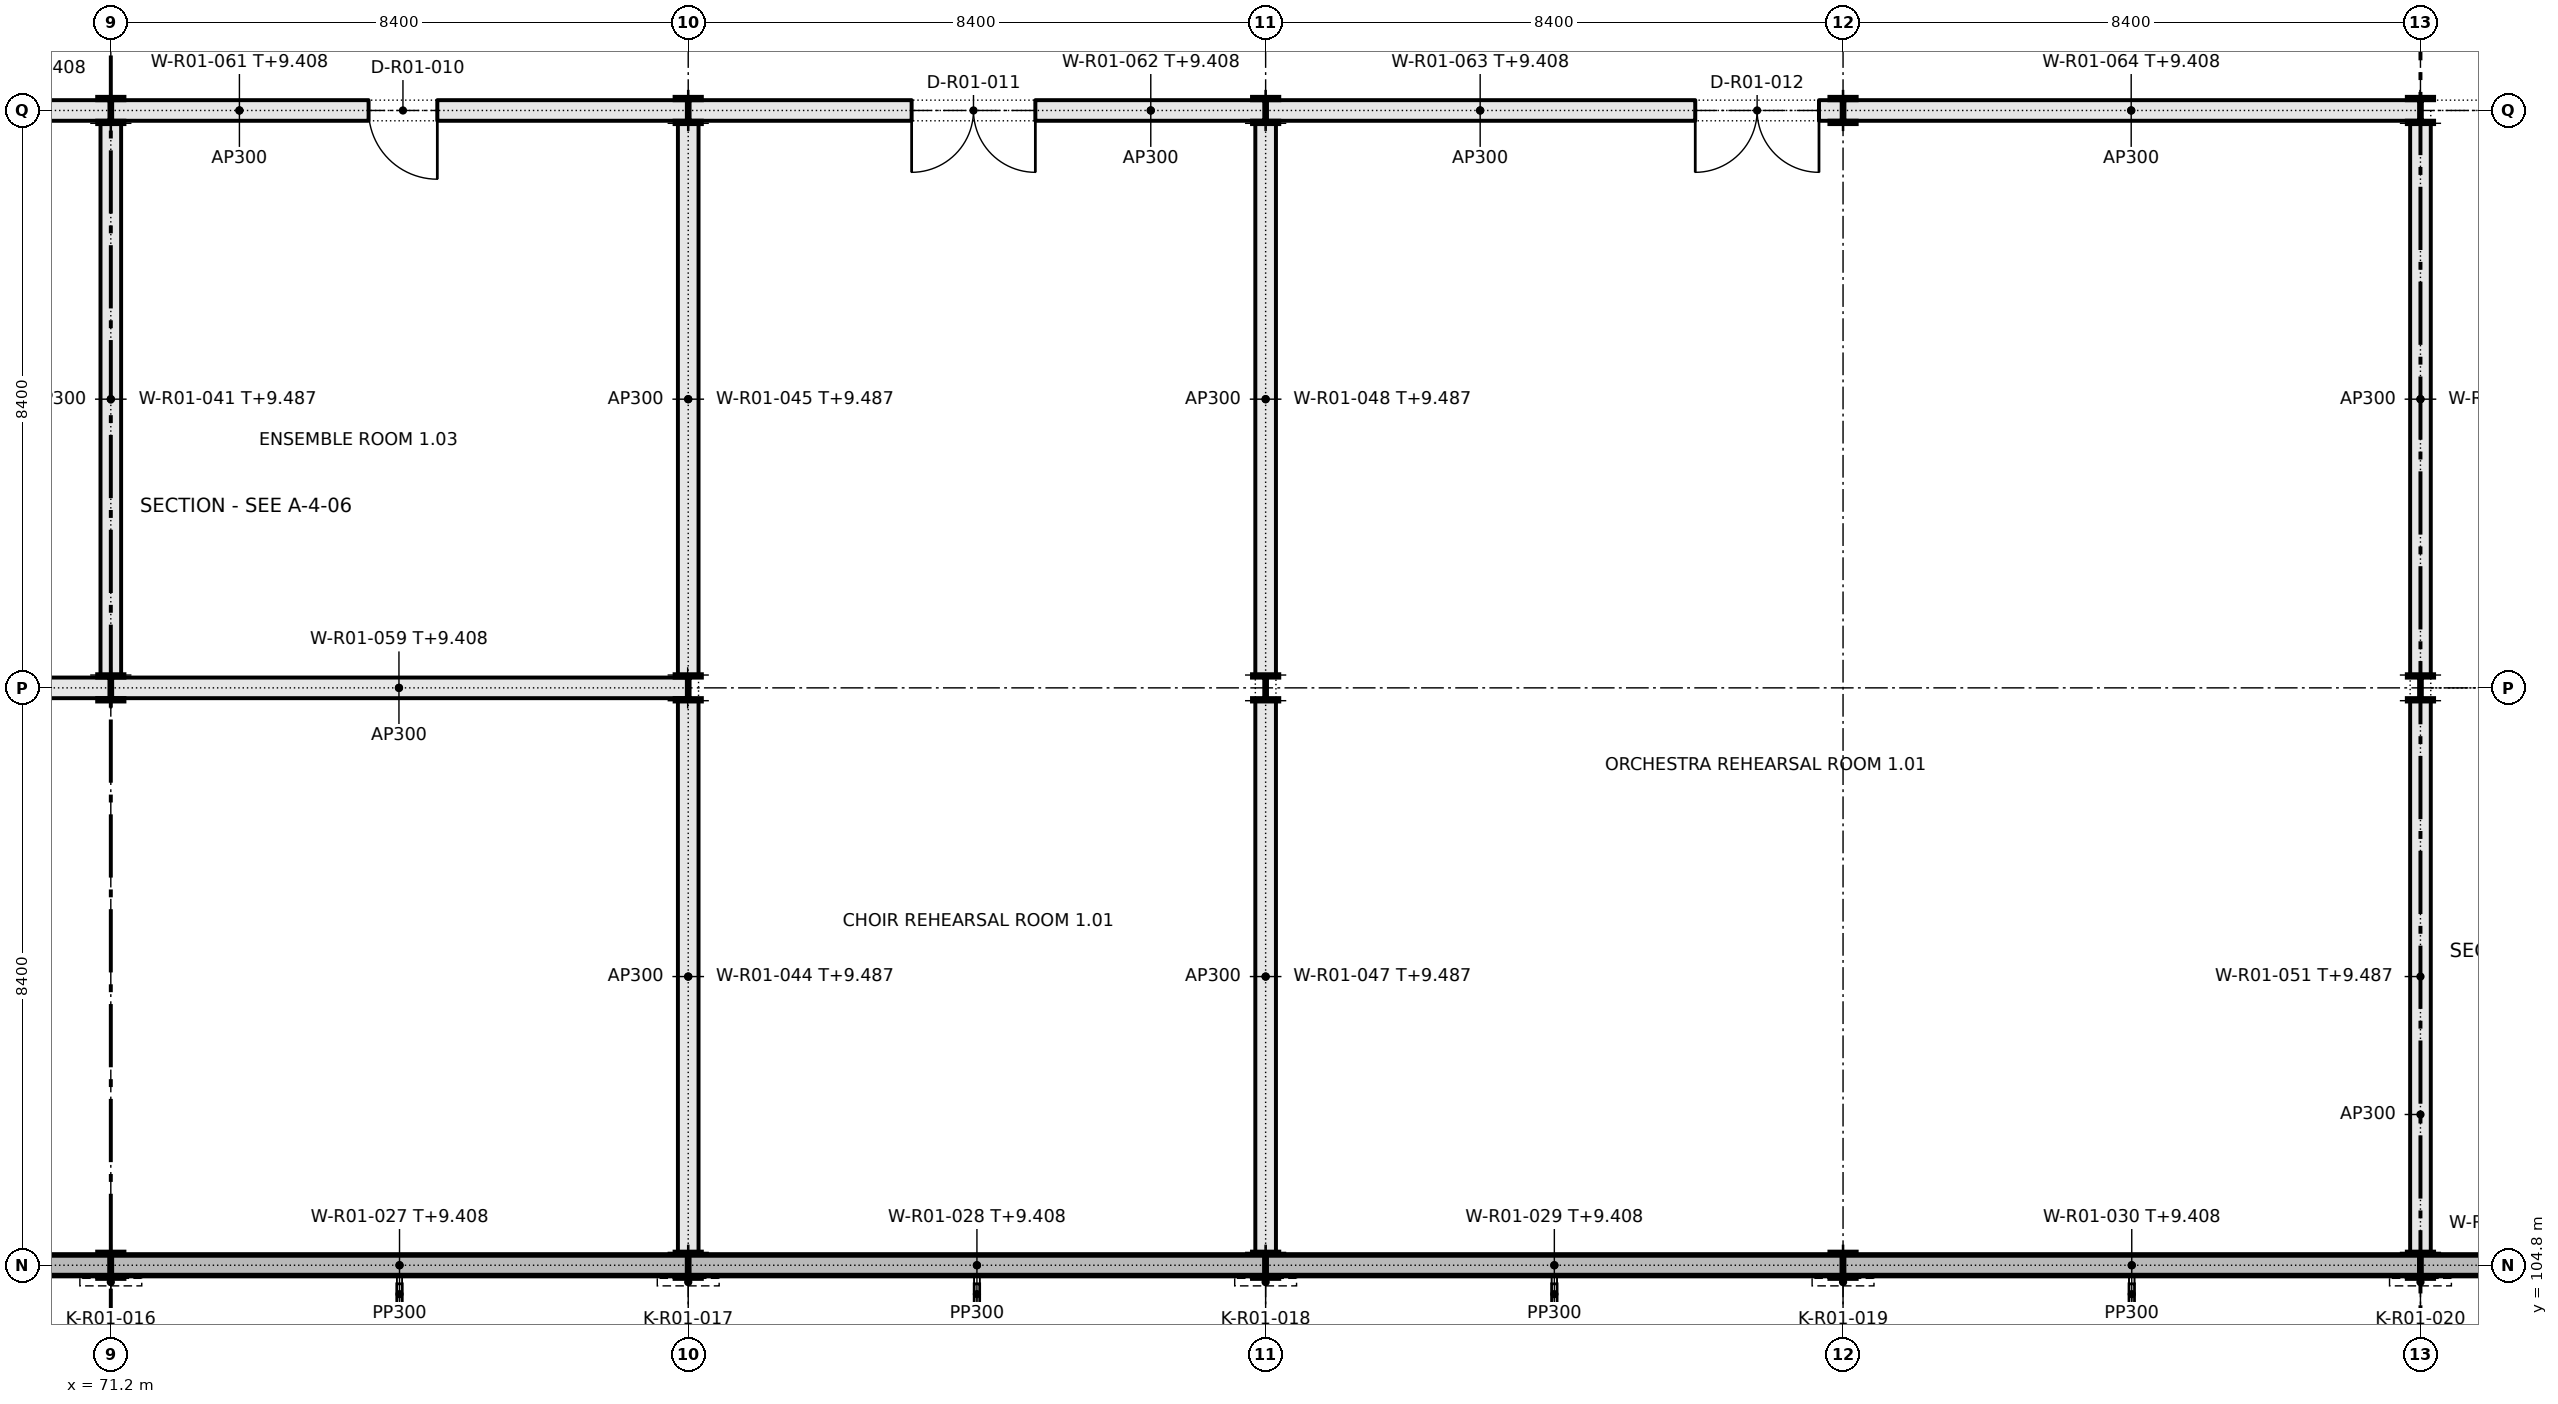
"""IFC4 building model, lengths in metres.
Left out: names, types, materials, properties, quantities, classifications, styles, units other than length and angle.
Written with IfcOpenShell. Run it as: python <this file> out.ifc"""

import sys

from ifc_helpers import new_model, si_unit, direction, frame, frame_2d, origin, origin_2d, place, context, subcontext, project, spatial, rectangle, i_section, extrude, element, fill, save


model = new_model("IFC4")
c1 = context("Model", 3, precision=1e-05, world=origin(), true_north=direction((0.0, 1.0)))
c2 = subcontext(c1, "Body", "Model", "MODEL_VIEW")
j1 = project(units=[si_unit("LENGTHUNIT", "METRE"), si_unit("PLANEANGLEUNIT", "RADIAN")], contexts=[c1])
p1 = place(None, origin())
s1 = spatial("IfcSite", under=j1, at=p1, CompositionType="ELEMENT")
p2 = place(p1, origin())
s2 = spatial("IfcBuilding", under=s1, at=p2, CompositionType="ELEMENT")
p3 = place(p2, frame((0.0, 0.0, 5.4)))
s3 = spatial("IfcBuildingStorey", under=s2, at=p3, CompositionType="ELEMENT", Elevation=5.4)
for number, where, z_axis, x_axis in (
    (1, (71.2, 104.8, 0.0), (0.0, 0.0, 1.0), (1.0, 0.0, 0.0)),
    (2, (71.2, 113.2, 0.0), (0.0, 0.0, 1.0), (1.0, 0.0, 0.0)),
    (3, (71.2, 121.6, 0.0), (0.0, 0.0, 1.0), (1.0, 0.0, 0.0)),
    (4, (79.6, 104.8, 0.0), (0.0, 0.0, 1.0), (1.0, 0.0, 0.0)),
    (5, (79.6, 113.2, 0.0), (0.0, 0.0, 1.0), (1.0, 0.0, 0.0)),
    (6, (79.6, 121.6, 0.0), (0.0, 0.0, 1.0), (1.0, 0.0, 0.0)),
    (7, (88.0, 104.8, 0.0), (0.0, 0.0, 1.0), (1.0, 0.0, 0.0)),
    (8, (88.0, 113.2, 0.0), (0.0, 0.0, 1.0), (1.0, 0.0, 0.0)),
    (9, (88.0, 121.6, 0.0), (0.0, 0.0, 1.0), (1.0, 0.0, 0.0)),
    (10, (96.4, 104.8, 0.0), (0.0, 0.0, 1.0), (1.0, 0.0, 0.0)),
    (11, (96.4, 121.6, 0.0), (0.0, 0.0, 1.0), (1.0, 0.0, 0.0)),
    (12, (104.8, 104.8, 0.0), (0.0, 0.0, 1.0), (1.0, 0.0, 0.0)),
    (13, (104.8, 113.2, 0.0), (0.0, 0.0, 1.0), (1.0, 0.0, 0.0)),
    (14, (104.8, 121.6, 0.0), (0.0, 0.0, 1.0), (1.0, 0.0, 0.0)),
):
    element("IfcColumn", number, at=place(p3, frame(where, z_axis=z_axis, x_axis=x_axis)), inside=s3, PredefinedType="COLUMN", context=c2, shape_type="SweptSolid", body=[
        extrude(i_section(OverallWidth=0.373, OverallDepth=0.373, WebThickness=0.016, FlangeThickness=0.026, FilletRadius=0.015, at=origin_2d()), origin(), (0.0, 0.0, 1.0), 4.8),
    ])
p4 = place(p3, frame((62.808, 104.8, 0.0), z_axis=(0.0, 0.0, 1.0), x_axis=(1.0, 0.0, 0.0)))
e15 = element("IfcWall", 15, at=p4, inside=s3, PredefinedType="SOLIDWALL", context=c2, shape_type="SweptSolid", body=[
    extrude(rectangle(XDim=8.4, YDim=0.3, at=frame_2d((4.2, 0.0))), origin(), (0.0, 0.0, 1.0), 4.008),
])
p5 = place(p3, frame((71.192, 104.8, 0.0), z_axis=(0.0, 0.0, 1.0), x_axis=(1.0, 0.0, 0.0)))
e16 = element("IfcWall", 16, at=p5, inside=s3, PredefinedType="SOLIDWALL", context=c2, shape_type="SweptSolid", body=[
    extrude(rectangle(XDim=8.416, YDim=0.3, at=frame_2d((4.208, 0.0))), origin(), (0.0, 0.0, 1.0), 4.008),
])
for number, where, z_axis, x_axis in (
    (17, (79.592, 104.8, 0.0), (0.0, 0.0, 1.0), (1.0, 0.0, 0.0)),
    (18, (87.992, 104.8, 0.0), (0.0, 0.0, 1.0), (1.0, 0.0, 0.0)),
):
    element("IfcWall", number, at=place(p3, frame(where, z_axis=z_axis, x_axis=x_axis)), inside=s3, PredefinedType="SOLIDWALL", context=c2, shape_type="SweptSolid", body=[
        extrude(rectangle(XDim=8.417, YDim=0.3, at=frame_2d((4.208, 0.0))), origin(), (0.0, 0.0, 1.0), 4.008),
    ])
p6 = place(p3, frame((96.392, 104.8, 0.0), z_axis=(0.0, 0.0, 1.0), x_axis=(1.0, 0.0, 0.0)))
e19 = element("IfcWall", 19, at=p6, inside=s3, PredefinedType="SOLIDWALL", context=c2, shape_type="SweptSolid", body=[
    extrude(rectangle(XDim=8.416, YDim=0.3, at=frame_2d((4.208, 0.0))), origin(), (0.0, 0.0, 1.0), 4.008),
])
p7 = place(p3, frame((104.792, 104.8, 0.0), z_axis=(0.0, 0.0, 1.0), x_axis=(1.0, 0.0, 0.0)))
e20 = element("IfcWall", 20, at=p7, inside=s3, PredefinedType="SOLIDWALL", context=c2, shape_type="SweptSolid", body=[
    extrude(rectangle(XDim=8.417, YDim=0.3, at=frame_2d((4.208, 0.0))), origin(), (0.0, 0.0, 1.0), 4.008),
])
p8 = place(p7, frame((3.008, 0.0, 0.0)))
e21 = element("IfcOpeningElement", 21, at=p8, cuts=e20, PredefinedType="OPENING", context=c2, shape_type="SweptSolid", body=[
    extrude(rectangle(XDim=2.4, YDim=2.4, at=frame_2d((1.2, 1.2))), frame((0.0, 0.16, 0.0), z_axis=(0.0, -1.0, 0.0), x_axis=(1.0, 0.0, 0.0)), (0.0, 0.0, 1.0), 0.32),
])
p9 = place(p3, frame((71.2, 113.387, 0.0), z_axis=(0.0, 0.0, 1.0), x_axis=(0.0, 1.0, 0.0)))
e22 = element("IfcWall", 22, at=p9, inside=s3, PredefinedType="PARTITIONING", context=c2, shape_type="SweptSolid", body=[
    extrude(rectangle(XDim=8.027, YDim=0.3, at=frame_2d((4.013, 0.0))), origin(), (0.0, 0.0, 1.0), 4.087),
])
p10 = place(p3, frame((79.6, 104.987, 0.0), z_axis=(0.0, 0.0, 1.0), x_axis=(0.0, 1.0, 0.0)))
e23 = element("IfcWall", 23, at=p10, inside=s3, PredefinedType="PARTITIONING", context=c2, shape_type="SweptSolid", body=[
    extrude(rectangle(XDim=8.027, YDim=0.3, at=frame_2d((4.013, 0.0))), origin(), (0.0, 0.0, 1.0), 4.087),
])
p11 = place(p3, frame((79.6, 113.387, 0.0), z_axis=(0.0, 0.0, 1.0), x_axis=(0.0, 1.0, 0.0)))
e24 = element("IfcWall", 24, at=p11, inside=s3, PredefinedType="PARTITIONING", context=c2, shape_type="SweptSolid", body=[
    extrude(rectangle(XDim=8.027, YDim=0.3, at=frame_2d((4.013, 0.0))), origin(), (0.0, 0.0, 1.0), 4.087),
])
p12 = place(p3, frame((88.0, 104.987, 0.0), z_axis=(0.0, 0.0, 1.0), x_axis=(0.0, 1.0, 0.0)))
e25 = element("IfcWall", 25, at=p12, inside=s3, PredefinedType="PARTITIONING", context=c2, shape_type="SweptSolid", body=[
    extrude(rectangle(XDim=8.027, YDim=0.3, at=frame_2d((4.013, 0.0))), origin(), (0.0, 0.0, 1.0), 4.087),
])
p13 = place(p3, frame((88.0, 113.387, 0.0), z_axis=(0.0, 0.0, 1.0), x_axis=(0.0, 1.0, 0.0)))
e26 = element("IfcWall", 26, at=p13, inside=s3, PredefinedType="PARTITIONING", context=c2, shape_type="SweptSolid", body=[
    extrude(rectangle(XDim=8.027, YDim=0.3, at=frame_2d((4.013, 0.0))), origin(), (0.0, 0.0, 1.0), 4.087),
])
p14 = place(p3, frame((104.8, 104.987, 0.0), z_axis=(0.0, 0.0, 1.0), x_axis=(0.0, 1.0, 0.0)))
e27 = element("IfcWall", 27, at=p14, inside=s3, PredefinedType="PARTITIONING", context=c2, shape_type="SweptSolid", body=[
    extrude(rectangle(XDim=8.027, YDim=0.3, at=frame_2d((4.013, 0.0))), origin(), (0.0, 0.0, 1.0), 4.087),
])
p15 = place(p3, frame((104.8, 113.387, 0.0), z_axis=(0.0, 0.0, 1.0), x_axis=(0.0, 1.0, 0.0)))
e28 = element("IfcWall", 28, at=p15, inside=s3, PredefinedType="PARTITIONING", context=c2, shape_type="SweptSolid", body=[
    extrude(rectangle(XDim=8.027, YDim=0.3, at=frame_2d((4.013, 0.0))), origin(), (0.0, 0.0, 1.0), 4.087),
])
p16 = place(p3, frame((62.792, 113.2, 0.0), z_axis=(0.0, 0.0, 1.0), x_axis=(1.0, 0.0, 0.0)))
e29 = element("IfcWall", 29, at=p16, inside=s3, PredefinedType="PARTITIONING", context=c2, shape_type="SweptSolid", body=[
    extrude(rectangle(XDim=8.417, YDim=0.3, at=frame_2d((4.208, 0.0))), origin(), (0.0, 0.0, 1.0), 4.008),
])
p17 = place(p3, frame((71.192, 113.2, 0.0), z_axis=(0.0, 0.0, 1.0), x_axis=(1.0, 0.0, 0.0)))
e30 = element("IfcWall", 30, at=p17, inside=s3, PredefinedType="PARTITIONING", context=c2, shape_type="SweptSolid", body=[
    extrude(rectangle(XDim=8.4, YDim=0.3, at=frame_2d((4.2, 0.0))), origin(), (0.0, 0.0, 1.0), 4.008),
])
p18 = place(p3, frame((62.808, 121.6, 0.0), z_axis=(0.0, 0.0, 1.0), x_axis=(1.0, 0.0, 0.0)))
e31 = element("IfcWall", 31, at=p18, inside=s3, PredefinedType="PARTITIONING", context=c2, shape_type="SweptSolid", body=[
    extrude(rectangle(XDim=8.4, YDim=0.3, at=frame_2d((4.2, 0.0))), origin(), (0.0, 0.0, 1.0), 4.008),
])
p19 = place(p18, frame((3.642, 0.0, 0.0)))
e32 = element("IfcOpeningElement", 32, at=p19, cuts=e31, PredefinedType="OPENING", context=c2, shape_type="SweptSolid", body=[
    extrude(rectangle(XDim=1.0, YDim=2.1, at=frame_2d((0.5, 1.05))), frame((0.0, 0.16, 0.0), z_axis=(0.0, -1.0, 0.0), x_axis=(1.0, 0.0, 0.0)), (0.0, 0.0, 1.0), 0.32),
])
p20 = place(p3, frame((71.192, 121.6, 0.0), z_axis=(0.0, 0.0, 1.0), x_axis=(1.0, 0.0, 0.0)))
e33 = element("IfcWall", 33, at=p20, inside=s3, PredefinedType="PARTITIONING", context=c2, shape_type="SweptSolid", body=[
    extrude(rectangle(XDim=8.416, YDim=0.3, at=frame_2d((4.208, 0.0))), origin(), (0.0, 0.0, 1.0), 4.008),
])
p21 = place(p20, frame((3.758, 0.0, 0.0)))
e34 = element("IfcOpeningElement", 34, at=p21, cuts=e33, PredefinedType="OPENING", context=c2, shape_type="SweptSolid", body=[
    extrude(rectangle(XDim=1.0, YDim=2.1, at=frame_2d((0.5, 1.05))), frame((0.0, 0.16, 0.0), z_axis=(0.0, -1.0, 0.0), x_axis=(1.0, 0.0, 0.0)), (0.0, 0.0, 1.0), 0.32),
])
p22 = place(p3, frame((79.592, 121.6, 0.0), z_axis=(0.0, 0.0, 1.0), x_axis=(1.0, 0.0, 0.0)))
e35 = element("IfcWall", 35, at=p22, inside=s3, PredefinedType="PARTITIONING", context=c2, shape_type="SweptSolid", body=[
    extrude(rectangle(XDim=8.417, YDim=0.3, at=frame_2d((4.208, 0.0))), origin(), (0.0, 0.0, 1.0), 4.008),
])
p23 = place(p22, frame((3.258, 0.0, 0.0)))
e36 = element("IfcOpeningElement", 36, at=p23, cuts=e35, PredefinedType="OPENING", context=c2, shape_type="SweptSolid", body=[
    extrude(rectangle(XDim=1.8, YDim=2.1, at=frame_2d((0.9, 1.05))), frame((0.0, 0.16, 0.0), z_axis=(0.0, -1.0, 0.0), x_axis=(1.0, 0.0, 0.0)), (0.0, 0.0, 1.0), 0.32),
])
p24 = place(p3, frame((87.992, 121.6, 0.0), z_axis=(0.0, 0.0, 1.0), x_axis=(1.0, 0.0, 0.0)))
e37 = element("IfcWall", 37, at=p24, inside=s3, PredefinedType="PARTITIONING", context=c2, shape_type="SweptSolid", body=[
    extrude(rectangle(XDim=8.417, YDim=0.3, at=frame_2d((4.208, 0.0))), origin(), (0.0, 0.0, 1.0), 4.008),
])
p25 = place(p24, frame((6.258, 0.0, 0.0)))
e38 = element("IfcOpeningElement", 38, at=p25, cuts=e37, PredefinedType="OPENING", context=c2, shape_type="SweptSolid", body=[
    extrude(rectangle(XDim=1.8, YDim=2.1, at=frame_2d((0.9, 1.05))), frame((0.0, 0.16, 0.0), z_axis=(0.0, -1.0, 0.0), x_axis=(1.0, 0.0, 0.0)), (0.0, 0.0, 1.0), 0.32),
])
p26 = place(p3, frame((96.392, 121.6, 0.0), z_axis=(0.0, 0.0, 1.0), x_axis=(1.0, 0.0, 0.0)))
e39 = element("IfcWall", 39, at=p26, inside=s3, PredefinedType="PARTITIONING", context=c2, shape_type="SweptSolid", body=[
    extrude(rectangle(XDim=8.4, YDim=0.3, at=frame_2d((4.2, 0.0))), origin(), (0.0, 0.0, 1.0), 4.008),
])
p27 = place(p21, frame((1.0, 0.0, 0.0), z_axis=(0.0, 0.0, 1.0), x_axis=(-1.0, 0.0, 0.0)))
e40 = element("IfcDoor", 40, at=p27, inside=s3, OperationType="SINGLE_SWING_LEFT", PredefinedType="DOOR", context=c2, shape_type="SweptSolid", body=[
    extrude(rectangle(XDim=1.0, YDim=2.1, at=frame_2d((0.5, 1.05))), frame((0.0, 0.025, 0.0), z_axis=(0.0, -1.0, 0.0), x_axis=(1.0, 0.0, 0.0)), (0.0, 0.0, 1.0), 0.05),
])
fill(e34, e40)
p28 = place(p23, frame((1.8, 0.0, 0.0), z_axis=(0.0, 0.0, 1.0), x_axis=(-1.0, 0.0, 0.0)))
e41 = element("IfcDoor", 41, at=p28, inside=s3, OperationType="DOUBLE_DOOR_SINGLE_SWING", PredefinedType="DOOR", context=c2, shape_type="SweptSolid", body=[
    extrude(rectangle(XDim=1.8, YDim=2.1, at=frame_2d((0.9, 1.05))), frame((0.0, 0.025, 0.0), z_axis=(0.0, -1.0, 0.0), x_axis=(1.0, 0.0, 0.0)), (0.0, 0.0, 1.0), 0.05),
])
fill(e36, e41)
p29 = place(p25, frame((1.8, 0.0, 0.0), z_axis=(0.0, 0.0, 1.0), x_axis=(-1.0, 0.0, 0.0)))
e42 = element("IfcDoor", 42, at=p29, inside=s3, OperationType="DOUBLE_DOOR_SINGLE_SWING", PredefinedType="DOOR", context=c2, shape_type="SweptSolid", body=[
    extrude(rectangle(XDim=1.8, YDim=2.1, at=frame_2d((0.9, 1.05))), frame((0.0, 0.025, 0.0), z_axis=(0.0, -1.0, 0.0), x_axis=(1.0, 0.0, 0.0)), (0.0, 0.0, 1.0), 0.05),
])
fill(e38, e42)
save(model, sys.argv[1])
